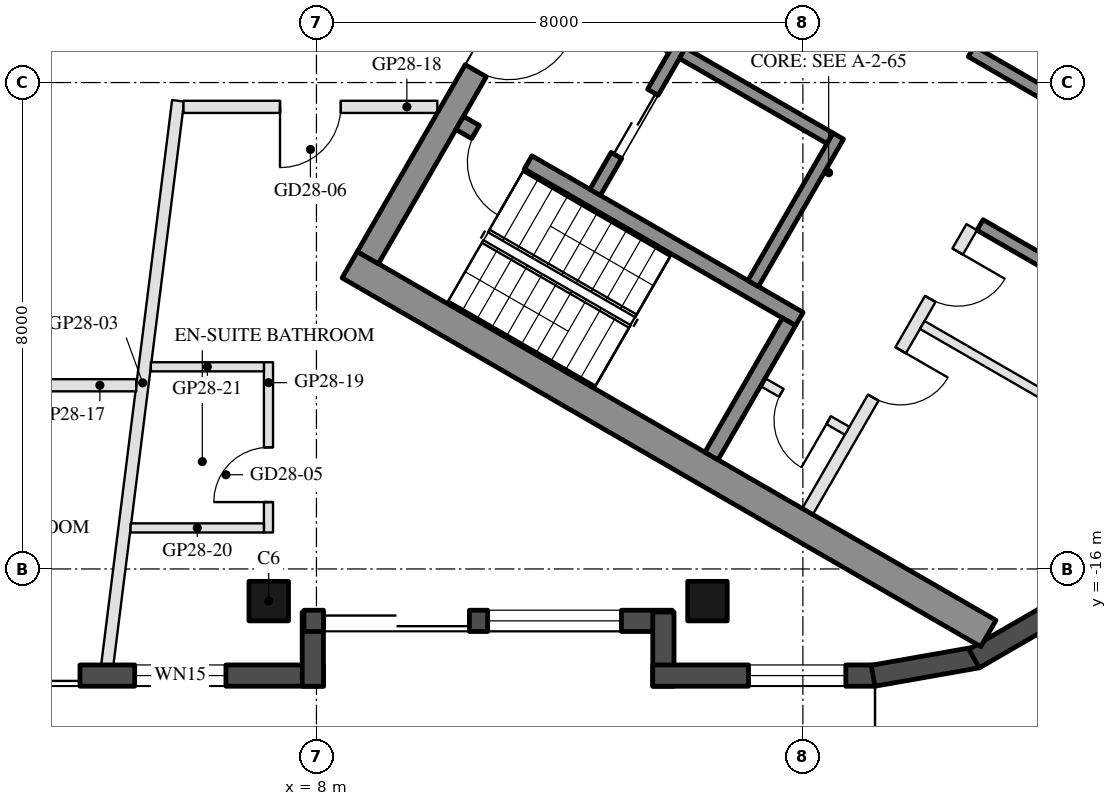
"""IFC4 building model, lengths in metres.
Left out: names, types, materials, properties, quantities, classifications, styles, units other than length and angle.
Written with IfcOpenShell. Run it as: python <this file> out.ifc"""

import sys

from ifc_helpers import new_model, si_unit, direction, frame, frame_2d, origin, origin_2d, place, context, subcontext, project, spatial, rectangle, hollow_rectangle, extrude, boolean, halfspace, element, fill, save


model = new_model("IFC4")
c1 = context("Model", 3, precision=1e-05, world=origin(), true_north=direction((0.0, 1.0)))
c2 = subcontext(c1, "Body", "Model", "MODEL_VIEW")
j1 = project(units=[si_unit("LENGTHUNIT", "METRE"), si_unit("PLANEANGLEUNIT", "RADIAN")], contexts=[c1])
p1 = place(None, origin())
s1 = spatial("IfcSite", under=j1, at=p1, CompositionType="ELEMENT")
p2 = place(p1, origin())
s2 = spatial("IfcBuilding", under=s1, at=p2, CompositionType="ELEMENT")
p3 = place(p2, frame((0.0, 0.0, 280.0)))
s3 = spatial("IfcBuildingStorey", under=s2, at=p3, CompositionType="ELEMENT", Elevation=280.0)
p4 = place(p3, frame((7.215, -16.529, 0.0), z_axis=(0.0, 0.0, 1.0), x_axis=(-1.0, 0.0, 0.0)))
e1 = element("IfcColumn", 1, at=p4, inside=s3, PredefinedType="COLUMN", context=c2, shape_type="SweptSolid", body=[
    boolean("DIFFERENCE", extrude(hollow_rectangle(XDim=0.65, YDim=0.65, WallThickness=0.03, at=origin_2d()), origin(), (0.0, 0.0, 1.0), 3.7), halfspace(frame((0.0, 0.0, 0.04), z_axis=(0.0, 0.0, 1.0), x_axis=(1.0, 0.0, 0.0)), True)),
])
p5 = place(p3, frame((14.431, -16.529, 0.0), z_axis=(0.0, 0.0, 1.0), x_axis=(-1.0, 0.0, 0.0)))
e2 = element("IfcColumn", 2, at=p5, inside=s3, PredefinedType="COLUMN", context=c2, shape_type="SweptSolid", body=[
    boolean("DIFFERENCE", extrude(hollow_rectangle(XDim=0.65, YDim=0.65, WallThickness=0.03, at=origin_2d()), origin(), (0.0, 0.0, 1.0), 3.7), halfspace(frame((0.0, 0.0, 0.047), z_axis=(0.0, 0.0, 1.0), x_axis=(1.0, 0.0, 0.0)), True)),
])
p6 = place(p3, frame((-0.9, -17.754, 0.0), z_axis=(0.0, 0.0, 1.0), x_axis=(1.0, 0.0, 0.0)))
e3 = element("IfcWall", 3, at=p6, inside=s3, PredefinedType="SOLIDWALL", context=c2, shape_type="SweptSolid", body=[
    extrude(rectangle(XDim=9.015, YDim=0.35, at=frame_2d((4.508, 0.0))), origin(), (0.0, 0.0, 1.0), 3.55),
])
p7 = place(p6, frame((3.211, 0.0, 0.0)))
e4 = element("IfcOpeningElement", 4, at=p7, cuts=e3, PredefinedType="OPENING", context=c2, shape_type="SweptSolid", body=[
    extrude(rectangle(XDim=1.8, YDim=2.4, at=frame_2d((0.9, 1.2))), frame((0.0, 0.185, 0.0), z_axis=(0.0, -1.0, 0.0), x_axis=(1.0, 0.0, 0.0)), (0.0, 0.0, 1.0), 0.37),
])
p8 = place(p6, frame((1.575, 0.0, 0.3)))
e5 = element("IfcOpeningElement", 5, at=p8, cuts=e3, PredefinedType="OPENING", context=c2, shape_type="SweptSolid", body=[
    extrude(rectangle(XDim=1.3, YDim=2.65, at=frame_2d((0.65, 1.325))), frame((0.0, 0.185, 0.0), z_axis=(0.0, -1.0, 0.0), x_axis=(1.0, 0.0, 0.0)), (0.0, 0.0, 1.0), 0.37),
])
p9 = place(p6, frame((5.911, 0.0, 0.3)))
e6 = element("IfcOpeningElement", 6, at=p9, cuts=e3, PredefinedType="OPENING", context=c2, shape_type="SweptSolid", body=[
    extrude(rectangle(XDim=1.5, YDim=2.65, at=frame_2d((0.75, 1.325))), frame((0.0, 0.185, 0.0), z_axis=(0.0, -1.0, 0.0), x_axis=(1.0, 0.0, 0.0)), (0.0, 0.0, 1.0), 0.37),
])
p10 = place(p3, frame((7.94, -17.929, 0.0), z_axis=(0.0, 0.0, 1.0), x_axis=(0.0, 1.0, 0.0)))
e7 = element("IfcWall", 7, at=p10, inside=s3, PredefinedType="SOLIDWALL", context=c2, shape_type="SweptSolid", body=[
    extrude(rectangle(XDim=1.22, YDim=0.35, at=frame_2d((0.61, 0.0))), origin(), (0.0, 0.0, 1.0), 3.55),
])
p11 = place(p3, frame((7.795, -16.854, 0.0), z_axis=(0.0, 0.0, 1.0), x_axis=(1.0, 0.0, 0.0)))
e8 = element("IfcWall", 8, at=p11, inside=s3, PredefinedType="SOLIDWALL", context=c2, shape_type="SweptSolid", body=[
    extrude(rectangle(XDim=6.055, YDim=0.35, at=frame_2d((3.028, 0.0))), origin(), (0.0, 0.0, 1.0), 3.55),
])
p12 = place(p11, frame((0.32, 0.0, 0.0)))
e9 = element("IfcOpeningElement", 9, at=p12, cuts=e8, PredefinedType="OPENING", context=c2, shape_type="SweptSolid", body=[
    extrude(rectangle(XDim=2.4, YDim=2.4, at=frame_2d((1.2, 1.2))), frame((0.0, 0.185, 0.0), z_axis=(0.0, -1.0, 0.0), x_axis=(1.0, 0.0, 0.0)), (0.0, 0.0, 1.0), 0.37),
])
p13 = place(p11, frame((3.02, 0.0, 0.3)))
e10 = element("IfcOpeningElement", 10, at=p13, cuts=e8, PredefinedType="OPENING", context=c2, shape_type="SweptSolid", body=[
    extrude(rectangle(XDim=2.2, YDim=2.65, at=frame_2d((1.1, 1.325))), frame((0.0, 0.185, 0.0), z_axis=(0.0, -1.0, 0.0), x_axis=(1.0, 0.0, 0.0)), (0.0, 0.0, 1.0), 0.37),
])
p14 = place(p3, frame((13.706, -16.709, 0.0), z_axis=(0.0, 0.0, 1.0), x_axis=(0.0, -1.0, 0.0)))
e11 = element("IfcWall", 11, at=p14, inside=s3, PredefinedType="SOLIDWALL", context=c2, shape_type="SweptSolid", body=[
    extrude(rectangle(XDim=1.22, YDim=0.35, at=frame_2d((0.61, 0.0))), origin(), (0.0, 0.0, 1.0), 3.55),
])
p15 = place(p3, frame((13.531, -17.754, 0.0), z_axis=(0.0, 0.0, 1.0), x_axis=(1.0, 0.0, 0.0)))
e12 = element("IfcWall", 12, at=p15, inside=s3, PredefinedType="SOLIDWALL", context=c2, shape_type="SweptSolid", body=[
    extrude(rectangle(XDim=3.654, YDim=0.35, at=frame_2d((1.827, 0.0))), origin(), (0.0, 0.0, 1.0), 3.55),
])
p16 = place(p15, frame((1.575, 0.0, 0.3)))
e13 = element("IfcOpeningElement", 13, at=p16, cuts=e12, PredefinedType="OPENING", context=c2, shape_type="SweptSolid", body=[
    extrude(rectangle(XDim=1.6, YDim=2.65, at=frame_2d((0.8, 1.325))), frame((0.0, 0.185, 0.0), z_axis=(0.0, -1.0, 0.0), x_axis=(1.0, 0.0, 0.0)), (0.0, 0.0, 1.0), 0.37),
])
for number, where, z_axis, x_axis in (
    (14, (17.155, -17.756, 0.0), (0.0, 0.0, 1.0), (0.985, 0.174, 0.0)),
    (15, (18.816, -17.474, 0.0), (0.0, 0.0, 1.0), (0.866, 0.5, 0.0)),
):
    element("IfcWall", number, at=place(p3, frame(where, z_axis=z_axis, x_axis=x_axis)), inside=s3, PredefinedType="SOLIDWALL", context=c2, shape_type="SweptSolid", body=[
        extrude(rectangle(XDim=1.745, YDim=0.35, at=frame_2d((0.872, 0.0))), origin(), (0.0, 0.0, 1.0), 3.55),
    ])
for number, where, z_axis, x_axis in (
    (16, (8.547, -10.997, 0.0), (0.0, 0.0, 1.0), (0.866, -0.5, 0.0)),
    (17, (13.797, -1.903, 0.0), (0.0, 0.0, 1.0), (0.866, -0.5, 0.0)),
):
    element("IfcWall", number, at=place(p3, frame(where, z_axis=z_axis, x_axis=x_axis)), inside=s3, PredefinedType="SHEAR", context=c2, shape_type="SweptSolid", body=[
        extrude(rectangle(XDim=12.129, YDim=0.5, at=frame_2d((6.064, 0.0))), origin(), (0.0, 0.0, 1.0), 3.5),
    ])
p17 = place(p3, frame((8.845, -10.88, 0.0), z_axis=(0.0, 0.0, 1.0), x_axis=(0.500004234368, 0.866022959057, 0.0)))
e18 = element("IfcWall", 18, at=p17, inside=s3, PredefinedType="SHEAR", context=c2, shape_type="SweptSolid", body=[
    extrude(rectangle(XDim=10.0, YDim=0.4, at=frame_2d((5.0, 0.0))), origin(), (0.0, 0.0, 1.0), 3.5),
])
p18 = place(p17, frame((3.55, 0.0, 0.0)))
e19 = element("IfcOpeningElement", 19, at=p18, cuts=e18, PredefinedType="OPENING", context=c2, shape_type="SweptSolid", body=[
    extrude(rectangle(XDim=1.1, YDim=2.1, at=frame_2d((0.55, 1.05))), frame((0.0, 0.21, 0.0), z_axis=(0.0, -1.0, 0.0), x_axis=(1.0, 0.0, 0.0)), (0.0, 0.0, 1.0), 0.42),
])
p19 = place(p17, frame((5.85, 0.0, 0.0)))
e20 = element("IfcOpeningElement", 20, at=p19, cuts=e18, PredefinedType="OPENING", context=c2, shape_type="SweptSolid", body=[
    extrude(rectangle(XDim=1.4, YDim=2.1, at=frame_2d((0.7, 1.05))), frame((0.0, 0.21, 0.0), z_axis=(0.0, -1.0, 0.0), x_axis=(1.0, 0.0, 0.0)), (0.0, 0.0, 1.0), 0.42),
])
p20 = place(p3, frame((10.356, -8.664, 0.0), z_axis=(0.0, 0.0, 1.0), x_axis=(0.866028629588, -0.499994412703, 0.0)))
e21 = element("IfcWall", 21, at=p20, inside=s3, PredefinedType="SHEAR", context=c2, shape_type="SweptSolid", body=[
    extrude(rectangle(XDim=6.45, YDim=0.25, at=frame_2d((3.225, 0.0))), origin(), (0.0, 0.0, 1.0), 3.5),
])
p21 = place(p20, frame((0.3, 0.0, 0.0)))
e22 = element("IfcOpeningElement", 22, at=p21, cuts=e21, PredefinedType="OPENING", context=c2, shape_type="SweptSolid", body=[
    extrude(rectangle(XDim=1.0, YDim=2.1, at=frame_2d((0.5, 1.05))), frame((0.0, 0.135, 0.0), z_axis=(0.0, -1.0, 0.0), x_axis=(1.0, 0.0, 0.0)), (0.0, 0.0, 1.0), 0.27),
])
p22 = place(p3, frame((14.496, -14.143, 0.0), z_axis=(0.0, 0.0, 1.0), x_axis=(0.500062241894, 0.865989465428, 0.0)))
e23 = element("IfcWall", 23, at=p22, inside=s3, PredefinedType="SHEAR", context=c2, shape_type="SweptSolid", body=[
    extrude(rectangle(XDim=2.55, YDim=0.25, at=frame_2d((1.275, 0.0))), origin(), (0.0, 0.0, 1.0), 3.5),
])
p23 = place(p3, frame((15.181, -11.305, 0.0), z_axis=(0.0, 0.0, 1.0), x_axis=(0.49994636267, 0.866056369097, 0.0)))
e24 = element("IfcWall", 24, at=p23, inside=s3, PredefinedType="SHEAR", context=c2, shape_type="SweptSolid", body=[
    extrude(rectangle(XDim=2.8, YDim=0.2, at=frame_2d((1.4, 0.0))), origin(), (0.0, 0.0, 1.0), 3.5),
])
p24 = place(p3, frame((12.583, -9.805, 0.0), z_axis=(0.0, 0.0, 1.0), x_axis=(0.49994636267, 0.866056369097, 0.0)))
e25 = element("IfcWall", 25, at=p24, inside=s3, PredefinedType="SHEAR", context=c2, shape_type="SweptSolid", body=[
    extrude(rectangle(XDim=2.8, YDim=0.2, at=frame_2d((1.4, 0.0))), origin(), (0.0, 0.0, 1.0), 3.5),
])
p25 = place(p24, frame((0.7, 0.0, 0.0)))
e26 = element("IfcOpeningElement", 26, at=p25, cuts=e25, PredefinedType="OPENING", context=c2, shape_type="SweptSolid", body=[
    extrude(rectangle(XDim=1.2, YDim=2.1, at=frame_2d((0.6, 1.05))), frame((0.0, 0.11, 0.0), z_axis=(0.0, -1.0, 0.0), x_axis=(1.0, 0.0, 0.0)), (0.0, 0.0, 1.0), 0.22),
])
p26 = place(p3, frame((11.768, -6.217, 0.0), z_axis=(0.0, 0.0, 1.0), x_axis=(0.866050077142, -0.499957262057, 0.0)))
e27 = element("IfcWall", 27, at=p26, inside=s3, PredefinedType="SHEAR", context=c2, shape_type="SweptSolid", body=[
    extrude(rectangle(XDim=2.4, YDim=0.2, at=frame_2d((1.2, 0.0))), origin(), (0.0, 0.0, 1.0), 3.5),
])
p27 = place(p3, frame((14.02, -7.517, 0.0), z_axis=(0.0, 0.0, 1.0), x_axis=(0.866034573852, -0.49998411664, 0.0)))
e28 = element("IfcWall", 28, at=p27, inside=s3, PredefinedType="SHEAR", context=c2, shape_type="SweptSolid", body=[
    extrude(rectangle(XDim=2.8, YDim=0.2, at=frame_2d((1.4, 0.0))), origin(), (0.0, 0.0, 1.0), 3.5),
])
p28 = place(p3, frame((12.968, -4.138, 0.0), z_axis=(0.0, 0.0, 1.0), x_axis=(0.866028328073, -0.49999493495, 0.0)))
e29 = element("IfcWall", 29, at=p28, inside=s3, PredefinedType="SHEAR", context=c2, shape_type="SweptSolid", body=[
    extrude(rectangle(XDim=10.16, YDim=0.2, at=frame_2d((5.08, 0.0))), origin(), (0.0, 0.0, 1.0), 3.5),
])
p29 = place(p28, frame((0.62, 0.0, 0.0)))
e30 = element("IfcOpeningElement", 30, at=p29, cuts=e29, PredefinedType="OPENING", context=c2, shape_type="SweptSolid", body=[
    extrude(rectangle(XDim=1.1, YDim=2.1, at=frame_2d((0.55, 1.05))), frame((0.0, 0.11, 0.0), z_axis=(0.0, -1.0, 0.0), x_axis=(1.0, 0.0, 0.0)), (0.0, 0.0, 1.0), 0.22),
])
p30 = place(p28, frame((5.8, 0.0, 0.0)))
e31 = element("IfcOpeningElement", 31, at=p30, cuts=e29, PredefinedType="OPENING", context=c2, shape_type="SweptSolid", body=[
    extrude(rectangle(XDim=0.9, YDim=2.1, at=frame_2d((0.45, 1.05))), frame((0.0, 0.11, 0.0), z_axis=(0.0, -1.0, 0.0), x_axis=(1.0, 0.0, 0.0)), (0.0, 0.0, 1.0), 0.22),
])
p31 = place(p3, frame((18.913, -10.342, 0.0), z_axis=(0.0, 0.0, 1.0), x_axis=(0.866038183914, -0.499977863513, 0.0)))
e32 = element("IfcWall", 32, at=p31, inside=s3, PredefinedType="SHEAR", context=c2, shape_type="SweptSolid", body=[
    extrude(rectangle(XDim=1.71, YDim=0.2, at=frame_2d((0.855, 0.0))), origin(), (0.0, 0.0, 1.0), 3.5),
])
p32 = place(p3, frame((16.076, -15.055, 0.0), z_axis=(0.0, 0.0, 1.0), x_axis=(0.499995103361, 0.866028230842, 0.0)))
e33 = element("IfcWall", 33, at=p32, inside=s3, PredefinedType="PARTITIONING", context=c2, shape_type="SweptSolid", body=[
    extrude(rectangle(XDim=5.4, YDim=0.2, at=frame_2d((2.7, 0.0))), origin(), (0.0, 0.0, 1.0), 3.5),
])
p33 = place(p32, frame((2.163, 0.0, 0.0)))
e34 = element("IfcOpeningElement", 34, at=p33, cuts=e33, PredefinedType="OPENING", context=c2, shape_type="SweptSolid", body=[
    extrude(rectangle(XDim=0.9, YDim=2.1, at=frame_2d((0.45, 1.05))), frame((0.0, 0.11, 0.0), z_axis=(0.0, -1.0, 0.0), x_axis=(1.0, 0.0, 0.0)), (0.0, 0.0, 1.0), 0.22),
])
p34 = place(p32, frame((4.038, 0.0, 0.0)))
e35 = element("IfcOpeningElement", 35, at=p34, cuts=e33, PredefinedType="OPENING", context=c2, shape_type="SweptSolid", body=[
    extrude(rectangle(XDim=0.9, YDim=2.1, at=frame_2d((0.45, 1.05))), frame((0.0, 0.11, 0.0), z_axis=(0.0, -1.0, 0.0), x_axis=(1.0, 0.0, 0.0)), (0.0, 0.0, 1.0), 0.22),
])
p35 = place(p3, frame((15.342, -12.928, 0.0), z_axis=(0.0, 0.0, 1.0), x_axis=(0.865989903783, -0.500061482766, 0.0)))
e36 = element("IfcWall", 36, at=p35, inside=s3, PredefinedType="PARTITIONING", context=c2, shape_type="SweptSolid", body=[
    extrude(rectangle(XDim=1.6, YDim=0.15, at=frame_2d((0.8, 0.0))), origin(), (0.0, 0.0, 1.0), 3.5),
])
p36 = place(p35, frame((0.35, 0.0, 0.0)))
e37 = element("IfcOpeningElement", 37, at=p36, cuts=e36, PredefinedType="OPENING", context=c2, shape_type="SweptSolid", body=[
    extrude(rectangle(XDim=0.9, YDim=2.1, at=frame_2d((0.45, 1.05))), frame((0.0, 0.085, 0.0), z_axis=(0.0, -1.0, 0.0), x_axis=(1.0, 0.0, 0.0)), (0.0, 0.0, 1.0), 0.17),
])
p37 = place(p3, frame((17.963, -11.987, 0.0), z_axis=(0.0, 0.0, 1.0), x_axis=(0.866010510293, -0.500025795397, 0.0)))
e38 = element("IfcWall", 38, at=p37, inside=s3, PredefinedType="PARTITIONING", context=c2, shape_type="SweptSolid", body=[
    extrude(rectangle(XDim=4.459, YDim=0.15, at=frame_2d((2.229, 0.0))), origin(), (0.0, 0.0, 1.0), 3.5),
])
p38 = place(p3, frame((4.56, -17.579, 0.0), z_axis=(0.0, 0.0, 1.0), x_axis=(0.124584174438, 0.992209042228, 0.0)))
e39 = element("IfcWall", 39, at=p38, inside=s3, PredefinedType="PARTITIONING", context=c2, shape_type="SweptSolid", body=[
    extrude(rectangle(XDim=9.351, YDim=0.2, at=frame_2d((4.676, 0.0))), origin(), (0.0, 0.0, 1.0), 3.16),
])
p39 = place(p3, frame((5.037, -12.979, 0.0), z_axis=(0.0, 0.0, 1.0), x_axis=(-1.0, 0.0, 0.0)))
e40 = element("IfcWall", 40, at=p39, inside=s3, PredefinedType="PARTITIONING", context=c2, shape_type="SweptSolid", body=[
    extrude(rectangle(XDim=4.988, YDim=0.2, at=frame_2d((2.494, 0.0))), origin(), (0.0, 0.0, 1.0), 3.05),
])
p40 = place(p39, frame((1.994, 0.0, 0.0)))
e41 = element("IfcOpeningElement", 41, at=p40, cuts=e40, PredefinedType="OPENING", context=c2, shape_type="SweptSolid", body=[
    extrude(rectangle(XDim=1.0, YDim=2.1, at=frame_2d((0.5, 1.05))), frame((0.0, 0.11, 0.0), z_axis=(0.0, -1.0, 0.0), x_axis=(1.0, 0.0, 0.0)), (0.0, 0.0, 1.0), 0.22),
])
p41 = place(p3, frame((9.988, -8.4, 0.0), z_axis=(0.0, 0.0, 1.0), x_axis=(-1.0, 0.0, 0.0)))
e42 = element("IfcWall", 42, at=p41, inside=s3, PredefinedType="PARTITIONING", context=c2, shape_type="SweptSolid", body=[
    extrude(rectangle(XDim=4.175, YDim=0.2, at=frame_2d((2.087, 0.0))), origin(), (0.0, 0.0, 1.0), 3.05),
])
p42 = place(p41, frame((1.587, 0.0, 0.0)))
e43 = element("IfcOpeningElement", 43, at=p42, cuts=e42, PredefinedType="OPENING", context=c2, shape_type="SweptSolid", body=[
    extrude(rectangle(XDim=1.0, YDim=2.1, at=frame_2d((0.5, 1.05))), frame((0.0, 0.11, 0.0), z_axis=(0.0, -1.0, 0.0), x_axis=(1.0, 0.0, 0.0)), (0.0, 0.0, 1.0), 0.22),
])
p43 = place(p3, frame((7.211, -15.4, 0.0), z_axis=(0.0, 0.0, 1.0), x_axis=(0.0, 1.0, 0.0)))
e44 = element("IfcWall", 44, at=p43, inside=s3, PredefinedType="PARTITIONING", context=c2, shape_type="SweptSolid", body=[
    extrude(rectangle(XDim=2.8, YDim=0.15, at=frame_2d((1.4, 0.0))), origin(), (0.0, 0.0, 1.0), 3.05),
])
p44 = place(p43, frame((0.5, 0.0, 0.0)))
e45 = element("IfcOpeningElement", 45, at=p44, cuts=e44, PredefinedType="OPENING", context=c2, shape_type="SweptSolid", body=[
    extrude(rectangle(XDim=0.9, YDim=2.1, at=frame_2d((0.45, 1.05))), frame((0.0, 0.085, 0.0), z_axis=(0.0, -1.0, 0.0), x_axis=(1.0, 0.0, 0.0)), (0.0, 0.0, 1.0), 0.17),
])
p45 = place(p3, frame((4.944, -15.325, 0.0), z_axis=(0.0, 0.0, 1.0), x_axis=(1.0, 0.0, 0.0)))
e46 = element("IfcWall", 46, at=p45, inside=s3, PredefinedType="PARTITIONING", context=c2, shape_type="SweptSolid", body=[
    extrude(rectangle(XDim=2.192, YDim=0.15, at=frame_2d((1.096, 0.0))), origin(), (0.0, 0.0, 1.0), 3.05),
])
p46 = place(p3, frame((5.277, -12.675, 0.0), z_axis=(0.0, 0.0, 1.0), x_axis=(1.0, 0.0, 0.0)))
e47 = element("IfcWall", 47, at=p46, inside=s3, PredefinedType="PARTITIONING", context=c2, shape_type="SweptSolid", body=[
    extrude(rectangle(XDim=1.859, YDim=0.15, at=frame_2d((0.93, 0.0))), origin(), (0.0, 0.0, 1.0), 3.05),
])
p47 = place(p7, frame((1.8, 0.0, 0.0), z_axis=(0.0, 0.0, 1.0), x_axis=(-1.0, 0.0, 0.0)))
e48 = element("IfcDoor", 48, at=p47, inside=s3, OperationType="SLIDING_TO_LEFT", PredefinedType="DOOR", context=c2, shape_type="SweptSolid", body=[
    extrude(rectangle(XDim=1.8, YDim=2.4, at=frame_2d((0.9, 1.2))), frame((0.0, 0.025, 0.0), z_axis=(0.0, -1.0, 0.0), x_axis=(1.0, 0.0, 0.0)), (0.0, 0.0, 1.0), 0.05),
])
fill(e4, e48)
p48 = place(p9, origin())
e49 = element("IfcWindow", 49, at=p48, inside=s3, PartitioningType="SINGLE_PANEL", PredefinedType="WINDOW", context=c2, shape_type="SweptSolid", body=[
    extrude(rectangle(XDim=1.5, YDim=2.65, at=frame_2d((0.75, 1.325))), frame((0.0, 0.03, 0.0), z_axis=(0.0, -1.0, 0.0), x_axis=(1.0, 0.0, 0.0)), (0.0, 0.0, 1.0), 0.06),
])
fill(e6, e49)
p49 = place(p12, frame((2.4, 0.0, 0.0), z_axis=(0.0, 0.0, 1.0), x_axis=(-1.0, 0.0, 0.0)))
e50 = element("IfcDoor", 50, at=p49, inside=s3, OperationType="SLIDING_TO_LEFT", PredefinedType="DOOR", context=c2, shape_type="SweptSolid", body=[
    extrude(rectangle(XDim=2.4, YDim=2.4, at=frame_2d((1.2, 1.2))), frame((0.0, 0.025, 0.0), z_axis=(0.0, -1.0, 0.0), x_axis=(1.0, 0.0, 0.0)), (0.0, 0.0, 1.0), 0.05),
])
fill(e9, e50)
p50 = place(p13, origin())
e51 = element("IfcWindow", 51, at=p50, inside=s3, PartitioningType="SINGLE_PANEL", PredefinedType="WINDOW", context=c2, shape_type="SweptSolid", body=[
    extrude(rectangle(XDim=2.2, YDim=2.65, at=frame_2d((1.1, 1.325))), frame((0.0, 0.03, 0.0), z_axis=(0.0, -1.0, 0.0), x_axis=(1.0, 0.0, 0.0)), (0.0, 0.0, 1.0), 0.06),
])
fill(e10, e51)
p51 = place(p16, origin())
e52 = element("IfcWindow", 52, at=p51, inside=s3, PartitioningType="SINGLE_PANEL", PredefinedType="WINDOW", context=c2, shape_type="SweptSolid", body=[
    extrude(rectangle(XDim=1.6, YDim=2.65, at=frame_2d((0.8, 1.325))), frame((0.0, 0.03, 0.0), z_axis=(0.0, -1.0, 0.0), x_axis=(1.0, 0.0, 0.0)), (0.0, 0.0, 1.0), 0.06),
])
fill(e13, e52)
p52 = place(p25, origin())
e53 = element("IfcDoor", 53, at=p52, inside=s3, OperationType="DOUBLE_DOOR_SLIDING", PredefinedType="DOOR", context=c2, shape_type="SweptSolid", body=[
    extrude(rectangle(XDim=1.2, YDim=2.1, at=frame_2d((0.6, 1.05))), frame((0.0, 0.025, 0.0), z_axis=(0.0, -1.0, 0.0), x_axis=(1.0, 0.0, 0.0)), (0.0, 0.0, 1.0), 0.05),
])
fill(e26, e53)
p53 = place(p36, frame((0.9, 0.0, 0.0), z_axis=(0.0, 0.0, 1.0), x_axis=(-1.0, 0.0, 0.0)))
e54 = element("IfcDoor", 54, at=p53, inside=s3, OperationType="SINGLE_SWING_LEFT", PredefinedType="DOOR", context=c2, shape_type="SweptSolid", body=[
    extrude(rectangle(XDim=0.9, YDim=2.1, at=frame_2d((0.45, 1.05))), frame((0.0, 0.025, 0.0), z_axis=(0.0, -1.0, 0.0), x_axis=(1.0, 0.0, 0.0)), (0.0, 0.0, 1.0), 0.05),
])
fill(e37, e54)
p54 = place(p30, origin())
e55 = element("IfcDoor", 55, at=p54, inside=s3, OperationType="SINGLE_SWING_LEFT", PredefinedType="DOOR", context=c2, shape_type="SweptSolid", body=[
    extrude(rectangle(XDim=0.9, YDim=2.1, at=frame_2d((0.45, 1.05))), frame((0.0, 0.025, 0.0), z_axis=(0.0, -1.0, 0.0), x_axis=(1.0, 0.0, 0.0)), (0.0, 0.0, 1.0), 0.05),
])
fill(e31, e55)
p55 = place(p33, frame((0.9, 0.0, 0.0), z_axis=(0.0, 0.0, 1.0), x_axis=(-1.0, 0.0, 0.0)))
e56 = element("IfcDoor", 56, at=p55, inside=s3, OperationType="SINGLE_SWING_LEFT", PredefinedType="DOOR", context=c2, shape_type="SweptSolid", body=[
    extrude(rectangle(XDim=0.9, YDim=2.1, at=frame_2d((0.45, 1.05))), frame((0.0, 0.025, 0.0), z_axis=(0.0, -1.0, 0.0), x_axis=(1.0, 0.0, 0.0)), (0.0, 0.0, 1.0), 0.05),
])
fill(e34, e56)
p56 = place(p34, frame((0.9, 0.0, 0.0), z_axis=(0.0, 0.0, 1.0), x_axis=(-1.0, 0.0, 0.0)))
e57 = element("IfcDoor", 57, at=p56, inside=s3, OperationType="SINGLE_SWING_LEFT", PredefinedType="DOOR", context=c2, shape_type="SweptSolid", body=[
    extrude(rectangle(XDim=0.9, YDim=2.1, at=frame_2d((0.45, 1.05))), frame((0.0, 0.025, 0.0), z_axis=(0.0, -1.0, 0.0), x_axis=(1.0, 0.0, 0.0)), (0.0, 0.0, 1.0), 0.05),
])
fill(e35, e57)
p57 = place(p18, frame((1.1, 0.0, 0.0), z_axis=(0.0, 0.0, 1.0), x_axis=(-1.0, 0.0, 0.0)))
e58 = element("IfcDoor", 58, at=p57, inside=s3, OperationType="SINGLE_SWING_LEFT", PredefinedType="DOOR", context=c2, shape_type="SweptSolid", body=[
    extrude(rectangle(XDim=1.1, YDim=2.1, at=frame_2d((0.55, 1.05))), frame((0.0, 0.025, 0.0), z_axis=(0.0, -1.0, 0.0), x_axis=(1.0, 0.0, 0.0)), (0.0, 0.0, 1.0), 0.05),
])
fill(e19, e58)
p58 = place(p21, frame((1.0, 0.0, 0.0), z_axis=(0.0, 0.0, 1.0), x_axis=(-1.0, 0.0, 0.0)))
e59 = element("IfcDoor", 59, at=p58, inside=s3, OperationType="SINGLE_SWING_LEFT", PredefinedType="DOOR", context=c2, shape_type="SweptSolid", body=[
    extrude(rectangle(XDim=1.0, YDim=2.1, at=frame_2d((0.5, 1.05))), frame((0.0, 0.025, 0.0), z_axis=(0.0, -1.0, 0.0), x_axis=(1.0, 0.0, 0.0)), (0.0, 0.0, 1.0), 0.05),
])
fill(e22, e59)
p59 = place(p44, origin())
e60 = element("IfcDoor", 60, at=p59, inside=s3, OperationType="SINGLE_SWING_LEFT", PredefinedType="DOOR", context=c2, shape_type="SweptSolid", body=[
    extrude(rectangle(XDim=0.9, YDim=2.1, at=frame_2d((0.45, 1.05))), frame((0.0, 0.025, 0.0), z_axis=(0.0, -1.0, 0.0), x_axis=(1.0, 0.0, 0.0)), (0.0, 0.0, 1.0), 0.05),
])
fill(e45, e60)
p60 = place(p42, origin())
e61 = element("IfcDoor", 61, at=p60, inside=s3, OperationType="SINGLE_SWING_RIGHT", PredefinedType="DOOR", context=c2, shape_type="SweptSolid", body=[
    extrude(rectangle(XDim=1.0, YDim=2.1, at=frame_2d((0.5, 1.05))), frame((0.0, 0.025, 0.0), z_axis=(0.0, -1.0, 0.0), x_axis=(1.0, 0.0, 0.0)), (0.0, 0.0, 1.0), 0.05),
])
fill(e43, e61)
save(model, sys.argv[1])
